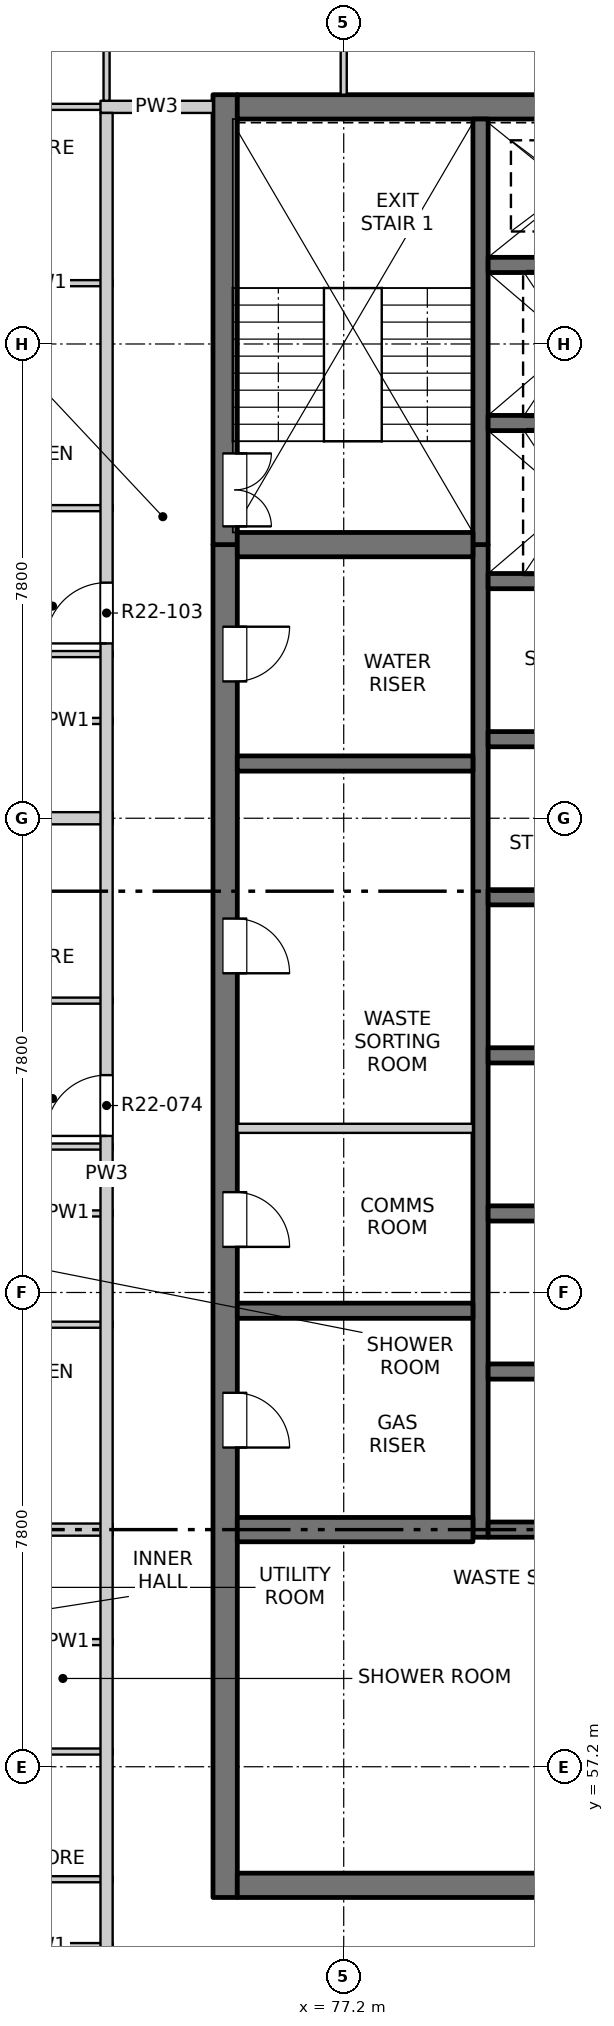
"""IFC4 building model, lengths in metres.
Left out: names, types, materials, properties, quantities, classifications, styles, units other than length and angle.
Written with IfcOpenShell. Run it as: python <this file> out.ifc"""

import sys

from ifc_helpers import new_model, si_unit, direction, frame, frame_2d, origin, place, context, subcontext, project, spatial, rectangle, extrude, element, fill, save


model = new_model("IFC4")
c1 = context("Model", 3, precision=1e-05, world=origin(), true_north=direction((0.0, 1.0)))
c2 = subcontext(c1, "Body", "Model", "MODEL_VIEW")
j1 = project(units=[si_unit("LENGTHUNIT", "METRE"), si_unit("PLANEANGLEUNIT", "RADIAN")], contexts=[c1])
p1 = place(None, origin())
s1 = spatial("IfcSite", under=j1, at=p1, CompositionType="ELEMENT")
p2 = place(p1, origin())
s2 = spatial("IfcBuilding", under=s1, at=p2, CompositionType="ELEMENT")
p3 = place(p2, frame((0.0, 0.0, 224.5)))
s3 = spatial("IfcBuildingStorey", under=s2, at=p3, CompositionType="ELEMENT", Elevation=224.5)
p4 = place(p3, frame((75.25, 55.05, -0.25), z_axis=(0.0, 0.0, 1.0), x_axis=(0.0, 1.0, 0.0)))
e1 = element("IfcWall", 1, at=p4, inside=s3, PredefinedType="SOLIDWALL", context=c2, shape_type="SweptSolid", body=[
    extrude(rectangle(XDim=22.25, YDim=0.4, at=frame_2d((11.125, 0.0))), origin(), (0.0, 0.0, 1.0), 3.4),
])
p5 = place(p4, frame((7.4, 0.0, 0.25)))
e2 = element("IfcOpeningElement", 2, at=p5, cuts=e1, PredefinedType="OPENING", context=c2, shape_type="SweptSolid", body=[
    extrude(rectangle(XDim=0.9, YDim=2.1, at=frame_2d((0.45, 1.05))), frame((0.0, 0.21, 0.0), z_axis=(0.0, -1.0, 0.0), x_axis=(1.0, 0.0, 0.0)), (0.0, 0.0, 1.0), 0.42),
])
p6 = place(p4, frame((10.7, 0.0, 0.25)))
e3 = element("IfcOpeningElement", 3, at=p6, cuts=e1, PredefinedType="OPENING", context=c2, shape_type="SweptSolid", body=[
    extrude(rectangle(XDim=0.9, YDim=2.1, at=frame_2d((0.45, 1.05))), frame((0.0, 0.21, 0.0), z_axis=(0.0, -1.0, 0.0), x_axis=(1.0, 0.0, 0.0)), (0.0, 0.0, 1.0), 0.42),
])
p7 = place(p4, frame((15.2, 0.0, 0.25)))
e4 = element("IfcOpeningElement", 4, at=p7, cuts=e1, PredefinedType="OPENING", context=c2, shape_type="SweptSolid", body=[
    extrude(rectangle(XDim=0.9, YDim=2.1, at=frame_2d((0.45, 1.05))), frame((0.0, 0.21, 0.0), z_axis=(0.0, -1.0, 0.0), x_axis=(1.0, 0.0, 0.0)), (0.0, 0.0, 1.0), 0.42),
])
p8 = place(p4, frame((20.0, 0.0, 0.25)))
e5 = element("IfcOpeningElement", 5, at=p8, cuts=e1, PredefinedType="OPENING", context=c2, shape_type="SweptSolid", body=[
    extrude(rectangle(XDim=0.9, YDim=2.1, at=frame_2d((0.45, 1.05))), frame((0.0, 0.21, 0.0), z_axis=(0.0, -1.0, 0.0), x_axis=(1.0, 0.0, 0.0)), (0.0, 0.0, 1.0), 0.42),
])
p9 = place(p3, frame((75.25, 77.3, -0.25), z_axis=(0.0, 0.0, 1.0), x_axis=(0.0, 1.0, 0.0)))
e6 = element("IfcWall", 6, at=p9, inside=s3, PredefinedType="SOLIDWALL", context=c2, shape_type="SweptSolid", body=[
    extrude(rectangle(XDim=7.4, YDim=0.4, at=frame_2d((3.7, 0.0))), origin(), (0.0, 0.0, 1.0), 3.4),
])
p10 = place(p9, frame((0.3, 0.0, 0.25)))
e7 = element("IfcOpeningElement", 7, at=p10, cuts=e6, PredefinedType="OPENING", context=c2, shape_type="SweptSolid", body=[
    extrude(rectangle(XDim=1.2, YDim=2.1, at=frame_2d((0.6, 1.05))), frame((0.0, 0.21, 0.0), z_axis=(0.0, -1.0, 0.0), x_axis=(1.0, 0.0, 0.0)), (0.0, 0.0, 1.0), 0.42),
])
p11 = place(p3, frame((75.45, 55.25, -0.25), z_axis=(0.0, 0.0, 1.0), x_axis=(1.0, 0.0, 0.0)))
e8 = element("IfcWall", 8, at=p11, inside=s3, PredefinedType="SOLIDWALL", context=c2, shape_type="SweptSolid", body=[
    extrude(rectangle(XDim=19.1, YDim=0.4, at=frame_2d((9.55, 0.0))), origin(), (0.0, 0.0, 1.0), 3.4),
])
p12 = place(p11, frame((8.8, 0.0, 0.25)))
e9 = element("IfcOpeningElement", 9, at=p12, cuts=e8, PredefinedType="OPENING", context=c2, shape_type="SweptSolid", body=[
    extrude(rectangle(XDim=1.5, YDim=2.1, at=frame_2d((0.75, 1.05))), frame((0.0, 0.21, 0.0), z_axis=(0.0, -1.0, 0.0), x_axis=(1.0, 0.0, 0.0)), (0.0, 0.0, 1.0), 0.42),
])
p13 = place(p3, frame((75.45, 84.5, -0.25), z_axis=(0.0, 0.0, 1.0), x_axis=(1.0, 0.0, 0.0)))
e10 = element("IfcWall", 10, at=p13, inside=s3, PredefinedType="SOLIDWALL", context=c2, shape_type="SweptSolid", body=[
    extrude(rectangle(XDim=19.1, YDim=0.4, at=frame_2d((9.55, 0.0))), origin(), (0.0, 0.0, 1.0), 3.4),
])
p14 = place(p3, frame((79.45, 60.975, -0.25), z_axis=(0.0, 0.0, 1.0), x_axis=(0.0, 1.0, 0.0)))
e11 = element("IfcWall", 11, at=p14, inside=s3, PredefinedType="SOLIDWALL", context=c2, shape_type="SweptSolid", body=[
    extrude(rectangle(XDim=16.325, YDim=0.25, at=frame_2d((8.163, 0.0))), origin(), (0.0, 0.0, 1.0), 3.4),
])
p15 = place(p3, frame((79.45, 77.3, -0.25), z_axis=(0.0, 0.0, 1.0), x_axis=(0.0, 1.0, 0.0)))
e12 = element("IfcWall", 12, at=p15, inside=s3, PredefinedType="SOLIDWALL", context=c2, shape_type="SweptSolid", body=[
    extrude(rectangle(XDim=7.0, YDim=0.25, at=frame_2d((3.5, 0.0))), origin(), (0.0, 0.0, 1.0), 3.4),
])
for number, where, z_axis, x_axis in (
    (13, (79.575, 61.1, -0.25), (0.0, 0.0, 1.0), (1.0, 0.0, 0.0)),
    (14, (79.575, 63.7, -0.25), (0.0, 0.0, 1.0), (1.0, 0.0, 0.0)),
    (15, (79.575, 66.3, -0.25), (0.0, 0.0, 1.0), (1.0, 0.0, 0.0)),
    (16, (79.575, 68.9, -0.25), (0.0, 0.0, 1.0), (1.0, 0.0, 0.0)),
    (17, (79.575, 71.5, -0.25), (0.0, 0.0, 1.0), (1.0, 0.0, 0.0)),
    (18, (79.575, 74.1, -0.25), (0.0, 0.0, 1.0), (1.0, 0.0, 0.0)),
    (19, (79.575, 76.7, -0.25), (0.0, 0.0, 1.0), (1.0, 0.0, 0.0)),
    (20, (79.575, 79.3, -0.25), (0.0, 0.0, 1.0), (1.0, 0.0, 0.0)),
    (21, (79.575, 81.9, -0.25), (0.0, 0.0, 1.0), (1.0, 0.0, 0.0)),
):
    element("IfcWall", number, at=place(p3, frame(where, z_axis=z_axis, x_axis=x_axis)), inside=s3, PredefinedType="SOLIDWALL", context=c2, shape_type="SweptSolid", body=[
        extrude(rectangle(XDim=3.0, YDim=0.25, at=frame_2d((1.5, 0.0))), origin(), (0.0, 0.0, 1.0), 3.4),
    ])
p16 = place(p3, frame((75.45, 61.1, -0.25), z_axis=(0.0, 0.0, 1.0), x_axis=(1.0, 0.0, 0.0)))
e22 = element("IfcWall", 22, at=p16, inside=s3, PredefinedType="SOLIDWALL", context=c2, shape_type="SweptSolid", body=[
    extrude(rectangle(XDim=3.875, YDim=0.4, at=frame_2d((1.938, 0.0))), origin(), (0.0, 0.0, 1.0), 3.4),
])
for number, where, z_axis, x_axis in (
    (23, (75.45, 64.7, -0.25), (0.0, 0.0, 1.0), (1.0, 0.0, 0.0)),
    (24, (75.45, 73.7, -0.25), (0.0, 0.0, 1.0), (1.0, 0.0, 0.0)),
):
    element("IfcWall", number, at=place(p3, frame(where, z_axis=z_axis, x_axis=x_axis)), inside=s3, PredefinedType="SOLIDWALL", context=c2, shape_type="SweptSolid", body=[
        extrude(rectangle(XDim=3.875, YDim=0.25, at=frame_2d((1.938, 0.0))), origin(), (0.0, 0.0, 1.0), 3.4),
    ])
p17 = place(p3, frame((75.45, 77.3, -0.25), z_axis=(0.0, 0.0, 1.0), x_axis=(1.0, 0.0, 0.0)))
e25 = element("IfcWall", 25, at=p17, inside=s3, PredefinedType="SOLIDWALL", context=c2, shape_type="SweptSolid", body=[
    extrude(rectangle(XDim=3.875, YDim=0.4, at=frame_2d((1.938, 0.0))), origin(), (0.0, 0.0, 1.0), 3.4),
])
for number, where, z_axis, x_axis in (
    (26, (71.18, 54.25, 0.0), (0.0, 0.0, 1.0), (1.0, 0.0, 0.0)),
    (27, (71.18, 55.35, 0.0), (0.0, 0.0, 1.0), (1.0, 0.0, 0.0)),
    (28, (71.18, 57.45, 0.0), (0.0, 0.0, 1.0), (1.0, 0.0, 0.0)),
    (29, (71.18, 59.25, 0.0), (0.0, 0.0, 1.0), (1.0, 0.0, 0.0)),
):
    element("IfcWall", number, at=place(p3, frame(where, z_axis=z_axis, x_axis=x_axis)), inside=s3, PredefinedType="PARTITIONING", context=c2, shape_type="SweptSolid", body=[
        extrude(rectangle(XDim=2.22, YDim=0.1, at=frame_2d((1.11, 0.0))), origin(), (0.0, 0.0, 1.0), 3.15),
    ])
p18 = place(p3, frame((61.9, 61.1, 0.0), z_axis=(0.0, 0.0, 1.0), x_axis=(1.0, 0.0, 0.0)))
e30 = element("IfcWall", 30, at=p18, inside=s3, PredefinedType="PARTITIONING", context=c2, shape_type="SweptSolid", body=[
    extrude(rectangle(XDim=11.5, YDim=0.2, at=frame_2d((5.75, 0.0))), origin(), (0.0, 0.0, 1.0), 2.55),
])
for number, where, z_axis, x_axis in (
    (31, (71.18, 64.47, 0.0), (0.0, 0.0, 1.0), (1.0, 0.0, 0.0)),
    (32, (71.18, 66.3, 0.0), (0.0, 0.0, 1.0), (1.0, 0.0, 0.0)),
    (33, (71.18, 67.4, 0.0), (0.0, 0.0, 1.0), (1.0, 0.0, 0.0)),
):
    element("IfcWall", number, at=place(p3, frame(where, z_axis=z_axis, x_axis=x_axis)), inside=s3, PredefinedType="PARTITIONING", context=c2, shape_type="SweptSolid", body=[
        extrude(rectangle(XDim=2.22, YDim=0.1, at=frame_2d((1.11, 0.0))), origin(), (0.0, 0.0, 1.0), 3.15),
    ])
p19 = place(p3, frame((75.45, 67.7, 0.0), z_axis=(0.0, 0.0, 1.0), x_axis=(1.0, 0.0, 0.0)))
e34 = element("IfcWall", 34, at=p19, inside=s3, PredefinedType="PARTITIONING", context=c2, shape_type="SweptSolid", body=[
    extrude(rectangle(XDim=3.875, YDim=0.15, at=frame_2d((1.938, 0.0))), origin(), (0.0, 0.0, 1.0), 3.15),
])
p20 = place(p3, frame((71.18, 69.8, 0.0), z_axis=(0.0, 0.0, 1.0), x_axis=(1.0, 0.0, 0.0)))
e35 = element("IfcWall", 35, at=p20, inside=s3, PredefinedType="PARTITIONING", context=c2, shape_type="SweptSolid", body=[
    extrude(rectangle(XDim=2.22, YDim=0.1, at=frame_2d((1.11, 0.0))), origin(), (0.0, 0.0, 1.0), 3.15),
])
p21 = place(p3, frame((61.9, 72.8, 0.0), z_axis=(0.0, 0.0, 1.0), x_axis=(1.0, 0.0, 0.0)))
e36 = element("IfcWall", 36, at=p21, inside=s3, PredefinedType="PARTITIONING", context=c2, shape_type="SweptSolid", body=[
    extrude(rectangle(XDim=11.5, YDim=0.2, at=frame_2d((5.75, 0.0))), origin(), (0.0, 0.0, 1.0), 3.15),
])
for number, where, z_axis, x_axis in (
    (37, (71.18, 74.4, 0.0), (0.0, 0.0, 1.0), (1.0, 0.0, 0.0)),
    (38, (71.18, 75.5, 0.0), (0.0, 0.0, 1.0), (1.0, 0.0, 0.0)),
    (39, (71.18, 77.9, 0.0), (0.0, 0.0, 1.0), (1.0, 0.0, 0.0)),
    (40, (71.18, 81.6, 0.0), (0.0, 0.0, 1.0), (1.0, 0.0, 0.0)),
):
    element("IfcWall", number, at=place(p3, frame(where, z_axis=z_axis, x_axis=x_axis)), inside=s3, PredefinedType="PARTITIONING", context=c2, shape_type="SweptSolid", body=[
        extrude(rectangle(XDim=2.22, YDim=0.1, at=frame_2d((1.11, 0.0))), origin(), (0.0, 0.0, 1.0), 3.15),
    ])
p22 = place(p3, frame((61.9, 84.5, 0.0), z_axis=(0.0, 0.0, 1.0), x_axis=(1.0, 0.0, 0.0)))
e41 = element("IfcWall", 41, at=p22, inside=s3, PredefinedType="PARTITIONING", context=c2, shape_type="SweptSolid", body=[
    extrude(rectangle(XDim=11.5, YDim=0.1, at=frame_2d((5.75, 0.0))), origin(), (0.0, 0.0, 1.0), 3.15),
])
p23 = place(p22, frame((7.965, 0.0, 0.0)))
e42 = element("IfcOpeningElement", 42, at=p23, cuts=e41, PredefinedType="OPENING", context=c2, shape_type="SweptSolid", body=[
    extrude(rectangle(XDim=0.9, YDim=2.1, at=frame_2d((0.45, 1.05))), frame((0.0, 0.06, 0.0), z_axis=(0.0, -1.0, 0.0), x_axis=(1.0, 0.0, 0.0)), (0.0, 0.0, 1.0), 0.12),
])
p24 = place(p3, frame((73.2, 84.5, 0.0), z_axis=(0.0, 0.0, 1.0), x_axis=(1.0, 0.0, 0.0)))
e43 = element("IfcWall", 43, at=p24, inside=s3, PredefinedType="PARTITIONING", context=c2, shape_type="SweptSolid", body=[
    extrude(rectangle(XDim=1.85, YDim=0.2, at=frame_2d((0.925, 0.0))), origin(), (0.0, 0.0, 1.0), 3.15),
])
p25 = place(p3, frame((73.3, 49.5, 0.0), z_axis=(0.0, 0.0, 1.0), x_axis=(0.0, 1.0, 0.0)))
e44 = element("IfcWall", 44, at=p25, inside=s3, PredefinedType="PARTITIONING", context=c2, shape_type="SweptSolid", body=[
    extrude(rectangle(XDim=34.9, YDim=0.2, at=frame_2d((17.45, 0.0))), origin(), (0.0, 0.0, 1.0), 3.15),
])
p26 = place(p25, frame((3.575, 0.0, 0.0)))
e45 = element("IfcOpeningElement", 45, at=p26, cuts=e44, PredefinedType="OPENING", context=c2, shape_type="SweptSolid", body=[
    extrude(rectangle(XDim=1.0, YDim=2.1, at=frame_2d((0.5, 1.05))), frame((0.0, 0.11, 0.0), z_axis=(0.0, -1.0, 0.0), x_axis=(1.0, 0.0, 0.0)), (0.0, 0.0, 1.0), 0.22),
])
p27 = place(p25, frame((18.075, 0.0, 0.0)))
e46 = element("IfcOpeningElement", 46, at=p27, cuts=e44, PredefinedType="OPENING", context=c2, shape_type="SweptSolid", body=[
    extrude(rectangle(XDim=1.0, YDim=2.1, at=frame_2d((0.5, 1.05))), frame((0.0, 0.11, 0.0), z_axis=(0.0, -1.0, 0.0), x_axis=(1.0, 0.0, 0.0)), (0.0, 0.0, 1.0), 0.22),
])
p28 = place(p25, frame((26.175, 0.0, 0.0)))
e47 = element("IfcOpeningElement", 47, at=p28, cuts=e44, PredefinedType="OPENING", context=c2, shape_type="SweptSolid", body=[
    extrude(rectangle(XDim=1.0, YDim=2.1, at=frame_2d((0.5, 1.05))), frame((0.0, 0.11, 0.0), z_axis=(0.0, -1.0, 0.0), x_axis=(1.0, 0.0, 0.0)), (0.0, 0.0, 1.0), 0.22),
])
p29 = place(p3, frame((73.3, 84.6, 0.0), z_axis=(0.0, 0.0, 1.0), x_axis=(0.0, 1.0, 0.0)))
e48 = element("IfcWall", 48, at=p29, inside=s3, PredefinedType="PARTITIONING", context=c2, shape_type="SweptSolid", body=[
    extrude(rectangle(XDim=3.5, YDim=0.1, at=frame_2d((1.75, 0.0))), origin(), (0.0, 0.0, 1.0), 3.15),
])
p30 = place(p29, frame((1.4, 0.0, 0.0)))
e49 = element("IfcOpeningElement", 49, at=p30, cuts=e48, PredefinedType="OPENING", context=c2, shape_type="SweptSolid", body=[
    extrude(rectangle(XDim=0.9, YDim=2.1, at=frame_2d((0.45, 1.05))), frame((0.0, 0.06, 0.0), z_axis=(0.0, -1.0, 0.0), x_axis=(1.0, 0.0, 0.0)), (0.0, 0.0, 1.0), 0.12),
])
p31 = place(p3, frame((77.2, 84.7, 0.0), z_axis=(0.0, 0.0, 1.0), x_axis=(0.0, 1.0, 0.0)))
e50 = element("IfcWall", 50, at=p31, inside=s3, PredefinedType="PARTITIONING", context=c2, shape_type="SweptSolid", body=[
    extrude(rectangle(XDim=3.4, YDim=0.1, at=frame_2d((1.7, 0.0))), origin(), (0.0, 0.0, 1.0), 3.15),
])
p32 = place(p31, frame((1.3, 0.0, 0.0)))
e51 = element("IfcOpeningElement", 51, at=p32, cuts=e50, PredefinedType="OPENING", context=c2, shape_type="SweptSolid", body=[
    extrude(rectangle(XDim=0.9, YDim=2.1, at=frame_2d((0.45, 1.05))), frame((0.0, 0.06, 0.0), z_axis=(0.0, -1.0, 0.0), x_axis=(1.0, 0.0, 0.0)), (0.0, 0.0, 1.0), 0.12),
])
p33 = place(p5, origin())
e52 = element("IfcDoor", 52, at=p33, inside=s3, OperationType="SINGLE_SWING_RIGHT", PredefinedType="DOOR", context=c2, shape_type="SweptSolid", body=[
    extrude(rectangle(XDim=0.9, YDim=2.1, at=frame_2d((0.45, 1.05))), frame((0.0, -0.135, 0.0), z_axis=(0.0, -1.0, 0.0), x_axis=(1.0, 0.0, 0.0)), (0.0, 0.0, 1.0), 0.05),
])
fill(e2, e52)
p34 = place(p6, origin())
e53 = element("IfcDoor", 53, at=p34, inside=s3, OperationType="SINGLE_SWING_RIGHT", PredefinedType="DOOR", context=c2, shape_type="SweptSolid", body=[
    extrude(rectangle(XDim=0.9, YDim=2.1, at=frame_2d((0.45, 1.05))), frame((0.0, -0.135, 0.0), z_axis=(0.0, -1.0, 0.0), x_axis=(1.0, 0.0, 0.0)), (0.0, 0.0, 1.0), 0.05),
])
fill(e3, e53)
p35 = place(p27, origin())
e54 = element("IfcDoor", 54, at=p35, inside=s3, OperationType="SINGLE_SWING_RIGHT", PredefinedType="DOOR", context=c2, shape_type="SweptSolid", body=[
    extrude(rectangle(XDim=1.0, YDim=2.1, at=frame_2d((0.5, 1.05))), frame((0.0, 0.025, 0.0), z_axis=(0.0, -1.0, 0.0), x_axis=(1.0, 0.0, 0.0)), (0.0, 0.0, 1.0), 0.05),
])
fill(e46, e54)
p36 = place(p7, origin())
e55 = element("IfcDoor", 55, at=p36, inside=s3, OperationType="SINGLE_SWING_RIGHT", PredefinedType="DOOR", context=c2, shape_type="SweptSolid", body=[
    extrude(rectangle(XDim=0.9, YDim=2.1, at=frame_2d((0.45, 1.05))), frame((0.0, -0.135, 0.0), z_axis=(0.0, -1.0, 0.0), x_axis=(1.0, 0.0, 0.0)), (0.0, 0.0, 1.0), 0.05),
])
fill(e4, e55)
p37 = place(p8, origin())
e56 = element("IfcDoor", 56, at=p37, inside=s3, OperationType="SINGLE_SWING_LEFT", PredefinedType="DOOR", context=c2, shape_type="SweptSolid", body=[
    extrude(rectangle(XDim=0.9, YDim=2.1, at=frame_2d((0.45, 1.05))), frame((0.0, -0.135, 0.0), z_axis=(0.0, -1.0, 0.0), x_axis=(1.0, 0.0, 0.0)), (0.0, 0.0, 1.0), 0.05),
])
fill(e5, e56)
p38 = place(p28, origin())
e57 = element("IfcDoor", 57, at=p38, inside=s3, OperationType="SINGLE_SWING_RIGHT", PredefinedType="DOOR", context=c2, shape_type="SweptSolid", body=[
    extrude(rectangle(XDim=1.0, YDim=2.1, at=frame_2d((0.5, 1.05))), frame((0.0, 0.025, 0.0), z_axis=(0.0, -1.0, 0.0), x_axis=(1.0, 0.0, 0.0)), (0.0, 0.0, 1.0), 0.05),
])
fill(e47, e57)
p39 = place(p10, origin())
e58 = element("IfcDoor", 58, at=p39, inside=s3, OperationType="DOUBLE_DOOR_SINGLE_SWING", PredefinedType="DOOR", context=c2, shape_type="SweptSolid", body=[
    extrude(rectangle(XDim=1.2, YDim=2.1, at=frame_2d((0.6, 1.05))), frame((0.0, -0.135, 0.0), z_axis=(0.0, -1.0, 0.0), x_axis=(1.0, 0.0, 0.0)), (0.0, 0.0, 1.0), 0.05),
])
fill(e7, e58)
save(model, sys.argv[1])
